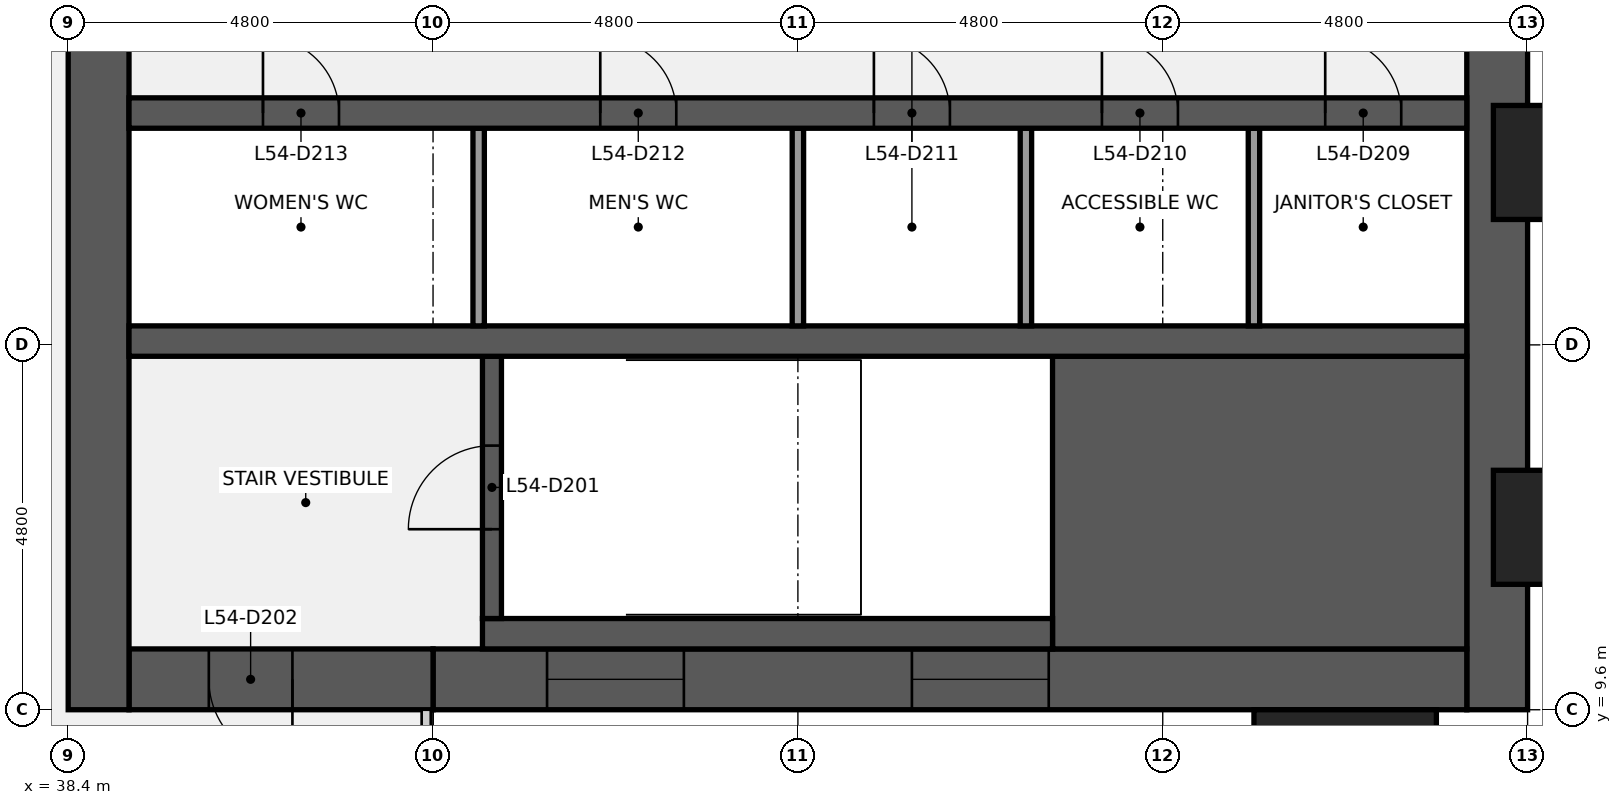
"""IFC4 building model, lengths in metres.
Left out: names, types, materials, properties, quantities, classifications, styles, units other than length and angle.
Written with IfcOpenShell. Run it as: python <this file> out.ifc"""

import sys

from ifc_helpers import new_model, si_unit, direction, frame, frame_2d, origin, origin_2d, place, context, subcontext, project, spatial, rectangle, extrude, element, fill, save


model = new_model("IFC4")
c1 = context("Model", 3, precision=1e-05, world=origin(), true_north=direction((0.0, 1.0)))
c2 = subcontext(c1, "Body", "Model", "MODEL_VIEW")
j1 = project(units=[si_unit("LENGTHUNIT", "METRE"), si_unit("PLANEANGLEUNIT", "RADIAN")], contexts=[c1])
p1 = place(None, origin())
s1 = spatial("IfcSite", under=j1, at=p1, CompositionType="ELEMENT")
p2 = place(p1, origin())
s2 = spatial("IfcBuilding", under=s1, at=p2, CompositionType="ELEMENT")
p3 = place(p2, frame((0.0, 0.0, 245.2)))
s3 = spatial("IfcBuildingStorey", under=s2, at=p3, CompositionType="ELEMENT", Elevation=245.2)
p4 = place(p3, frame((57.2, 38.4, 0.0), z_axis=(0.0, 0.0, 1.0), x_axis=(0.0, -1.0, 0.0)))
e1 = element("IfcWall", 1, at=p4, inside=s3, PredefinedType="SHEAR", context=c2, shape_type="SweptSolid", body=[
    extrude(rectangle(XDim=28.8, YDim=0.8, at=frame_2d((14.4, 0.0))), origin(), (0.0, 0.0, 1.0), 3.84),
])
p5 = place(p4, frame((18.45, 0.0, 0.9)))
e2 = element("IfcOpeningElement", 2, at=p5, cuts=e1, PredefinedType="OPENING", context=c2, shape_type="SweptSolid", body=[
    extrude(rectangle(XDim=1.5, YDim=1.5, at=frame_2d((0.75, 0.75))), frame((0.0, 0.41, 0.0), z_axis=(0.0, -1.0, 0.0), x_axis=(1.0, 0.0, 0.0)), (0.0, 0.0, 1.0), 0.82),
])
p6 = place(p4, frame((8.85, 0.0, 0.9)))
e3 = element("IfcOpeningElement", 3, at=p6, cuts=e1, PredefinedType="OPENING", context=c2, shape_type="SweptSolid", body=[
    extrude(rectangle(XDim=1.5, YDim=1.5, at=frame_2d((0.75, 0.75))), frame((0.0, 0.41, 0.0), z_axis=(0.0, -1.0, 0.0), x_axis=(1.0, 0.0, 0.0)), (0.0, 0.0, 1.0), 0.82),
])
p7 = place(p3, frame((56.8, 10.0, 0.0), z_axis=(0.0, 0.0, 1.0), x_axis=(-1.0, 0.0, 0.0)))
e4 = element("IfcWall", 4, at=p7, inside=s3, PredefinedType="SHEAR", context=c2, shape_type="SweptSolid", body=[
    extrude(rectangle(XDim=13.6, YDim=0.8, at=frame_2d((6.8, 0.0))), origin(), (0.0, 0.0, 1.0), 3.84),
])
p8 = place(p7, frame((5.5, 0.0, 0.9)))
e5 = element("IfcOpeningElement", 5, at=p8, cuts=e4, PredefinedType="OPENING", context=c2, shape_type="SweptSolid", body=[
    extrude(rectangle(XDim=1.8, YDim=1.5, at=frame_2d((0.9, 0.75))), frame((0.0, 0.41, 0.0), z_axis=(0.0, -1.0, 0.0), x_axis=(1.0, 0.0, 0.0)), (0.0, 0.0, 1.0), 0.82),
])
p9 = place(p7, frame((10.3, 0.0, 0.9)))
e6 = element("IfcOpeningElement", 6, at=p9, cuts=e4, PredefinedType="OPENING", context=c2, shape_type="SweptSolid", body=[
    extrude(rectangle(XDim=1.8, YDim=1.5, at=frame_2d((0.9, 0.75))), frame((0.0, 0.41, 0.0), z_axis=(0.0, -1.0, 0.0), x_axis=(1.0, 0.0, 0.0)), (0.0, 0.0, 1.0), 0.82),
])
p10 = place(p3, frame((43.2, 10.0, 0.0), z_axis=(0.0, 0.0, 1.0), x_axis=(-1.0, 0.0, 0.0)))
e7 = element("IfcWall", 7, at=p10, inside=s3, PredefinedType="SHEAR", context=c2, shape_type="SweptSolid", body=[
    extrude(rectangle(XDim=4.0, YDim=0.8, at=frame_2d((2.0, 0.0))), origin(), (0.0, 0.0, 1.0), 3.84),
])
p11 = place(p10, frame((1.85, 0.0, 0.0)))
e8 = element("IfcOpeningElement", 8, at=p11, cuts=e7, PredefinedType="OPENING", context=c2, shape_type="SweptSolid", body=[
    extrude(rectangle(XDim=1.1, YDim=2.1, at=frame_2d((0.55, 1.05))), frame((0.0, 0.41, 0.0), z_axis=(0.0, -1.0, 0.0), x_axis=(1.0, 0.0, 0.0)), (0.0, 0.0, 1.0), 0.82),
])
p12 = place(p3, frame((38.8, 9.6, 0.0), z_axis=(0.0, 0.0, 1.0), x_axis=(0.0, 1.0, 0.0)))
e9 = element("IfcWall", 9, at=p12, inside=s3, PredefinedType="SHEAR", context=c2, shape_type="SweptSolid", body=[
    extrude(rectangle(XDim=28.8, YDim=0.8, at=frame_2d((14.4, 0.0))), origin(), (0.0, 0.0, 1.0), 3.84),
])
p13 = place(p12, frame((8.7, 0.0, 0.0)))
e10 = element("IfcOpeningElement", 10, at=p13, cuts=e9, PredefinedType="OPENING", context=c2, shape_type="SweptSolid", body=[
    extrude(rectangle(XDim=1.8, YDim=2.1, at=frame_2d((0.9, 1.05))), frame((0.0, 0.41, 0.0), z_axis=(0.0, -1.0, 0.0), x_axis=(1.0, 0.0, 0.0)), (0.0, 0.0, 1.0), 0.82),
])
p14 = place(p12, frame((18.3, 0.0, 0.0)))
e11 = element("IfcOpeningElement", 11, at=p14, cuts=e9, PredefinedType="OPENING", context=c2, shape_type="SweptSolid", body=[
    extrude(rectangle(XDim=1.8, YDim=2.1, at=frame_2d((0.9, 1.05))), frame((0.0, 0.41, 0.0), z_axis=(0.0, -1.0, 0.0), x_axis=(1.0, 0.0, 0.0)), (0.0, 0.0, 1.0), 0.82),
])
p15 = place(p3, frame((51.35, 12.325, 0.0), z_axis=(0.0, 0.0, 1.0), x_axis=(1.0, 0.0, 0.0)))
e12 = element("IfcWall", 12, at=p15, inside=s3, PredefinedType="SHEAR", context=c2, shape_type="SweptSolid", body=[
    extrude(rectangle(XDim=5.45, YDim=3.85, at=frame_2d((2.725, 0.0))), origin(), (0.0, 0.0, 1.0), 3.84),
])
p16 = place(p3, frame((43.85, 10.6, 0.0), z_axis=(0.0, 0.0, 1.0), x_axis=(1.0, 0.0, 0.0)))
e13 = element("IfcWall", 13, at=p16, inside=s3, PredefinedType="SHEAR", context=c2, shape_type="SweptSolid", body=[
    extrude(rectangle(XDim=7.5, YDim=0.4, at=frame_2d((3.75, 0.0))), origin(), (0.0, 0.0, 1.0), 3.84),
])
p17 = place(p3, frame((43.975, 10.8, 0.0), z_axis=(0.0, 0.0, 1.0), x_axis=(0.0, 1.0, 0.0)))
e14 = element("IfcWall", 14, at=p17, inside=s3, PredefinedType="SHEAR", context=c2, shape_type="SweptSolid", body=[
    extrude(rectangle(XDim=3.45, YDim=0.25, at=frame_2d((1.725, 0.0))), origin(), (0.0, 0.0, 1.0), 3.84),
])
p18 = place(p17, frame((1.175, 0.0, 0.0)))
e15 = element("IfcOpeningElement", 15, at=p18, cuts=e14, PredefinedType="OPENING", context=c2, shape_type="SweptSolid", body=[
    extrude(rectangle(XDim=1.1, YDim=2.1, at=frame_2d((0.55, 1.05))), frame((0.0, 0.135, 0.0), z_axis=(0.0, -1.0, 0.0), x_axis=(1.0, 0.0, 0.0)), (0.0, 0.0, 1.0), 0.27),
])
p19 = place(p3, frame((39.2, 14.45, 0.0), z_axis=(0.0, 0.0, 1.0), x_axis=(1.0, 0.0, 0.0)))
e16 = element("IfcWall", 16, at=p19, inside=s3, PredefinedType="SHEAR", context=c2, shape_type="SweptSolid", body=[
    extrude(rectangle(XDim=17.6, YDim=0.4, at=frame_2d((8.8, 0.0))), origin(), (0.0, 0.0, 1.0), 3.84),
])
for number, where, z_axis, x_axis in (
    (17, (54.0, 14.65, 0.0), (0.0, 0.0, 1.0), (0.0, 1.0, 0.0)),
    (18, (51.0, 14.65, 0.0), (0.0, 0.0, 1.0), (0.0, 1.0, 0.0)),
    (19, (48.0, 14.65, 0.0), (0.0, 0.0, 1.0), (0.0, 1.0, 0.0)),
    (20, (43.8, 14.65, 0.0), (0.0, 0.0, 1.0), (0.0, 1.0, 0.0)),
):
    element("IfcWall", number, at=place(p3, frame(where, z_axis=z_axis, x_axis=x_axis)), inside=s3, PredefinedType="PARTITIONING", context=c2, shape_type="SweptSolid", body=[
        extrude(rectangle(XDim=2.6, YDim=0.15, at=frame_2d((1.3, 0.0))), origin(), (0.0, 0.0, 1.0), 3.84),
    ])
p20 = place(p3, frame((39.2, 17.45, 0.0), z_axis=(0.0, 0.0, 1.0), x_axis=(1.0, 0.0, 0.0)))
e21 = element("IfcWall", 21, at=p20, inside=s3, PredefinedType="SHEAR", context=c2, shape_type="SweptSolid", body=[
    extrude(rectangle(XDim=17.6, YDim=0.4, at=frame_2d((8.8, 0.0))), origin(), (0.0, 0.0, 1.0), 3.84),
])
p21 = place(p20, frame((15.738, 0.0, 0.0)))
e22 = element("IfcOpeningElement", 22, at=p21, cuts=e21, PredefinedType="OPENING", context=c2, shape_type="SweptSolid", body=[
    extrude(rectangle(XDim=1.0, YDim=2.1, at=frame_2d((0.5, 1.05))), frame((0.0, 0.21, 0.0), z_axis=(0.0, -1.0, 0.0), x_axis=(1.0, 0.0, 0.0)), (0.0, 0.0, 1.0), 0.42),
])
p22 = place(p20, frame((12.8, 0.0, 0.0)))
e23 = element("IfcOpeningElement", 23, at=p22, cuts=e21, PredefinedType="OPENING", context=c2, shape_type="SweptSolid", body=[
    extrude(rectangle(XDim=1.0, YDim=2.1, at=frame_2d((0.5, 1.05))), frame((0.0, 0.21, 0.0), z_axis=(0.0, -1.0, 0.0), x_axis=(1.0, 0.0, 0.0)), (0.0, 0.0, 1.0), 0.42),
])
p23 = place(p20, frame((9.8, 0.0, 0.0)))
e24 = element("IfcOpeningElement", 24, at=p23, cuts=e21, PredefinedType="OPENING", context=c2, shape_type="SweptSolid", body=[
    extrude(rectangle(XDim=1.0, YDim=2.1, at=frame_2d((0.5, 1.05))), frame((0.0, 0.21, 0.0), z_axis=(0.0, -1.0, 0.0), x_axis=(1.0, 0.0, 0.0)), (0.0, 0.0, 1.0), 0.42),
])
p24 = place(p20, frame((6.2, 0.0, 0.0)))
e25 = element("IfcOpeningElement", 25, at=p24, cuts=e21, PredefinedType="OPENING", context=c2, shape_type="SweptSolid", body=[
    extrude(rectangle(XDim=1.0, YDim=2.1, at=frame_2d((0.5, 1.05))), frame((0.0, 0.21, 0.0), z_axis=(0.0, -1.0, 0.0), x_axis=(1.0, 0.0, 0.0)), (0.0, 0.0, 1.0), 0.42),
])
p25 = place(p20, frame((1.762, 0.0, 0.0)))
e26 = element("IfcOpeningElement", 26, at=p25, cuts=e21, PredefinedType="OPENING", context=c2, shape_type="SweptSolid", body=[
    extrude(rectangle(XDim=1.0, YDim=2.1, at=frame_2d((0.5, 1.05))), frame((0.0, 0.21, 0.0), z_axis=(0.0, -1.0, 0.0), x_axis=(1.0, 0.0, 0.0)), (0.0, 0.0, 1.0), 0.42),
])
for number, where, z_axis, x_axis in (
    (27, (55.2, 8.85, 0.0), (0.0, 0.0, 1.0), (1.0, 0.0, 0.0)),
    (28, (58.35, 12.0, 0.0), (0.0, 0.0, 1.0), (0.0, 1.0, 0.0)),
    (29, (58.35, 16.8, 0.0), (0.0, 0.0, 1.0), (0.0, 1.0, 0.0)),
):
    element("IfcColumn", number, at=place(p3, frame(where, z_axis=z_axis, x_axis=x_axis)), inside=s3, PredefinedType="PILASTER", context=c2, shape_type="SweptSolid", body=[
        extrude(rectangle(XDim=2.4, YDim=1.5, at=origin_2d()), origin(), (0.0, 0.0, 1.0), 4.0),
    ])
p26 = place(p18, origin())
e30 = element("IfcDoor", 30, at=p26, inside=s3, OperationType="SINGLE_SWING_LEFT", PredefinedType="DOOR", context=c2, shape_type="SweptSolid", body=[
    extrude(rectangle(XDim=1.1, YDim=2.1, at=frame_2d((0.55, 1.05))), frame((0.0, 0.025, 0.0), z_axis=(0.0, -1.0, 0.0), x_axis=(1.0, 0.0, 0.0)), (0.0, 0.0, 1.0), 0.05),
])
fill(e15, e30)
p27 = place(p11, origin())
e31 = element("IfcDoor", 31, at=p27, inside=s3, OperationType="SINGLE_SWING_LEFT", PredefinedType="DOOR", context=c2, shape_type="SweptSolid", body=[
    extrude(rectangle(XDim=1.1, YDim=2.1, at=frame_2d((0.55, 1.05))), frame((0.0, 0.025, 0.0), z_axis=(0.0, -1.0, 0.0), x_axis=(1.0, 0.0, 0.0)), (0.0, 0.0, 1.0), 0.05),
])
fill(e8, e31)
p28 = place(p21, origin())
e32 = element("IfcDoor", 32, at=p28, inside=s3, OperationType="SINGLE_SWING_LEFT", PredefinedType="DOOR", context=c2, shape_type="SweptSolid", body=[
    extrude(rectangle(XDim=1.0, YDim=2.1, at=frame_2d((0.5, 1.05))), frame((0.0, 0.025, 0.0), z_axis=(0.0, -1.0, 0.0), x_axis=(1.0, 0.0, 0.0)), (0.0, 0.0, 1.0), 0.05),
])
fill(e22, e32)
p29 = place(p22, origin())
e33 = element("IfcDoor", 33, at=p29, inside=s3, OperationType="SINGLE_SWING_LEFT", PredefinedType="DOOR", context=c2, shape_type="SweptSolid", body=[
    extrude(rectangle(XDim=1.0, YDim=2.1, at=frame_2d((0.5, 1.05))), frame((0.0, 0.025, 0.0), z_axis=(0.0, -1.0, 0.0), x_axis=(1.0, 0.0, 0.0)), (0.0, 0.0, 1.0), 0.05),
])
fill(e23, e33)
p30 = place(p23, origin())
e34 = element("IfcDoor", 34, at=p30, inside=s3, OperationType="SINGLE_SWING_LEFT", PredefinedType="DOOR", context=c2, shape_type="SweptSolid", body=[
    extrude(rectangle(XDim=1.0, YDim=2.1, at=frame_2d((0.5, 1.05))), frame((0.0, 0.025, 0.0), z_axis=(0.0, -1.0, 0.0), x_axis=(1.0, 0.0, 0.0)), (0.0, 0.0, 1.0), 0.05),
])
fill(e24, e34)
p31 = place(p24, origin())
e35 = element("IfcDoor", 35, at=p31, inside=s3, OperationType="SINGLE_SWING_LEFT", PredefinedType="DOOR", context=c2, shape_type="SweptSolid", body=[
    extrude(rectangle(XDim=1.0, YDim=2.1, at=frame_2d((0.5, 1.05))), frame((0.0, 0.025, 0.0), z_axis=(0.0, -1.0, 0.0), x_axis=(1.0, 0.0, 0.0)), (0.0, 0.0, 1.0), 0.05),
])
fill(e25, e35)
p32 = place(p25, origin())
e36 = element("IfcDoor", 36, at=p32, inside=s3, OperationType="SINGLE_SWING_LEFT", PredefinedType="DOOR", context=c2, shape_type="SweptSolid", body=[
    extrude(rectangle(XDim=1.0, YDim=2.1, at=frame_2d((0.5, 1.05))), frame((0.0, 0.025, 0.0), z_axis=(0.0, -1.0, 0.0), x_axis=(1.0, 0.0, 0.0)), (0.0, 0.0, 1.0), 0.05),
])
fill(e26, e36)
p33 = place(p8, origin())
e37 = element("IfcWindow", 37, at=p33, inside=s3, PartitioningType="SINGLE_PANEL", PredefinedType="WINDOW", context=c2, shape_type="SweptSolid", body=[
    extrude(rectangle(XDim=1.8, YDim=1.5, at=frame_2d((0.9, 0.75))), frame((0.0, 0.03, 0.0), z_axis=(0.0, -1.0, 0.0), x_axis=(1.0, 0.0, 0.0)), (0.0, 0.0, 1.0), 0.06),
])
fill(e5, e37)
p34 = place(p9, origin())
e38 = element("IfcWindow", 38, at=p34, inside=s3, PartitioningType="SINGLE_PANEL", PredefinedType="WINDOW", context=c2, shape_type="SweptSolid", body=[
    extrude(rectangle(XDim=1.8, YDim=1.5, at=frame_2d((0.9, 0.75))), frame((0.0, 0.03, 0.0), z_axis=(0.0, -1.0, 0.0), x_axis=(1.0, 0.0, 0.0)), (0.0, 0.0, 1.0), 0.06),
])
fill(e6, e38)
save(model, sys.argv[1])
